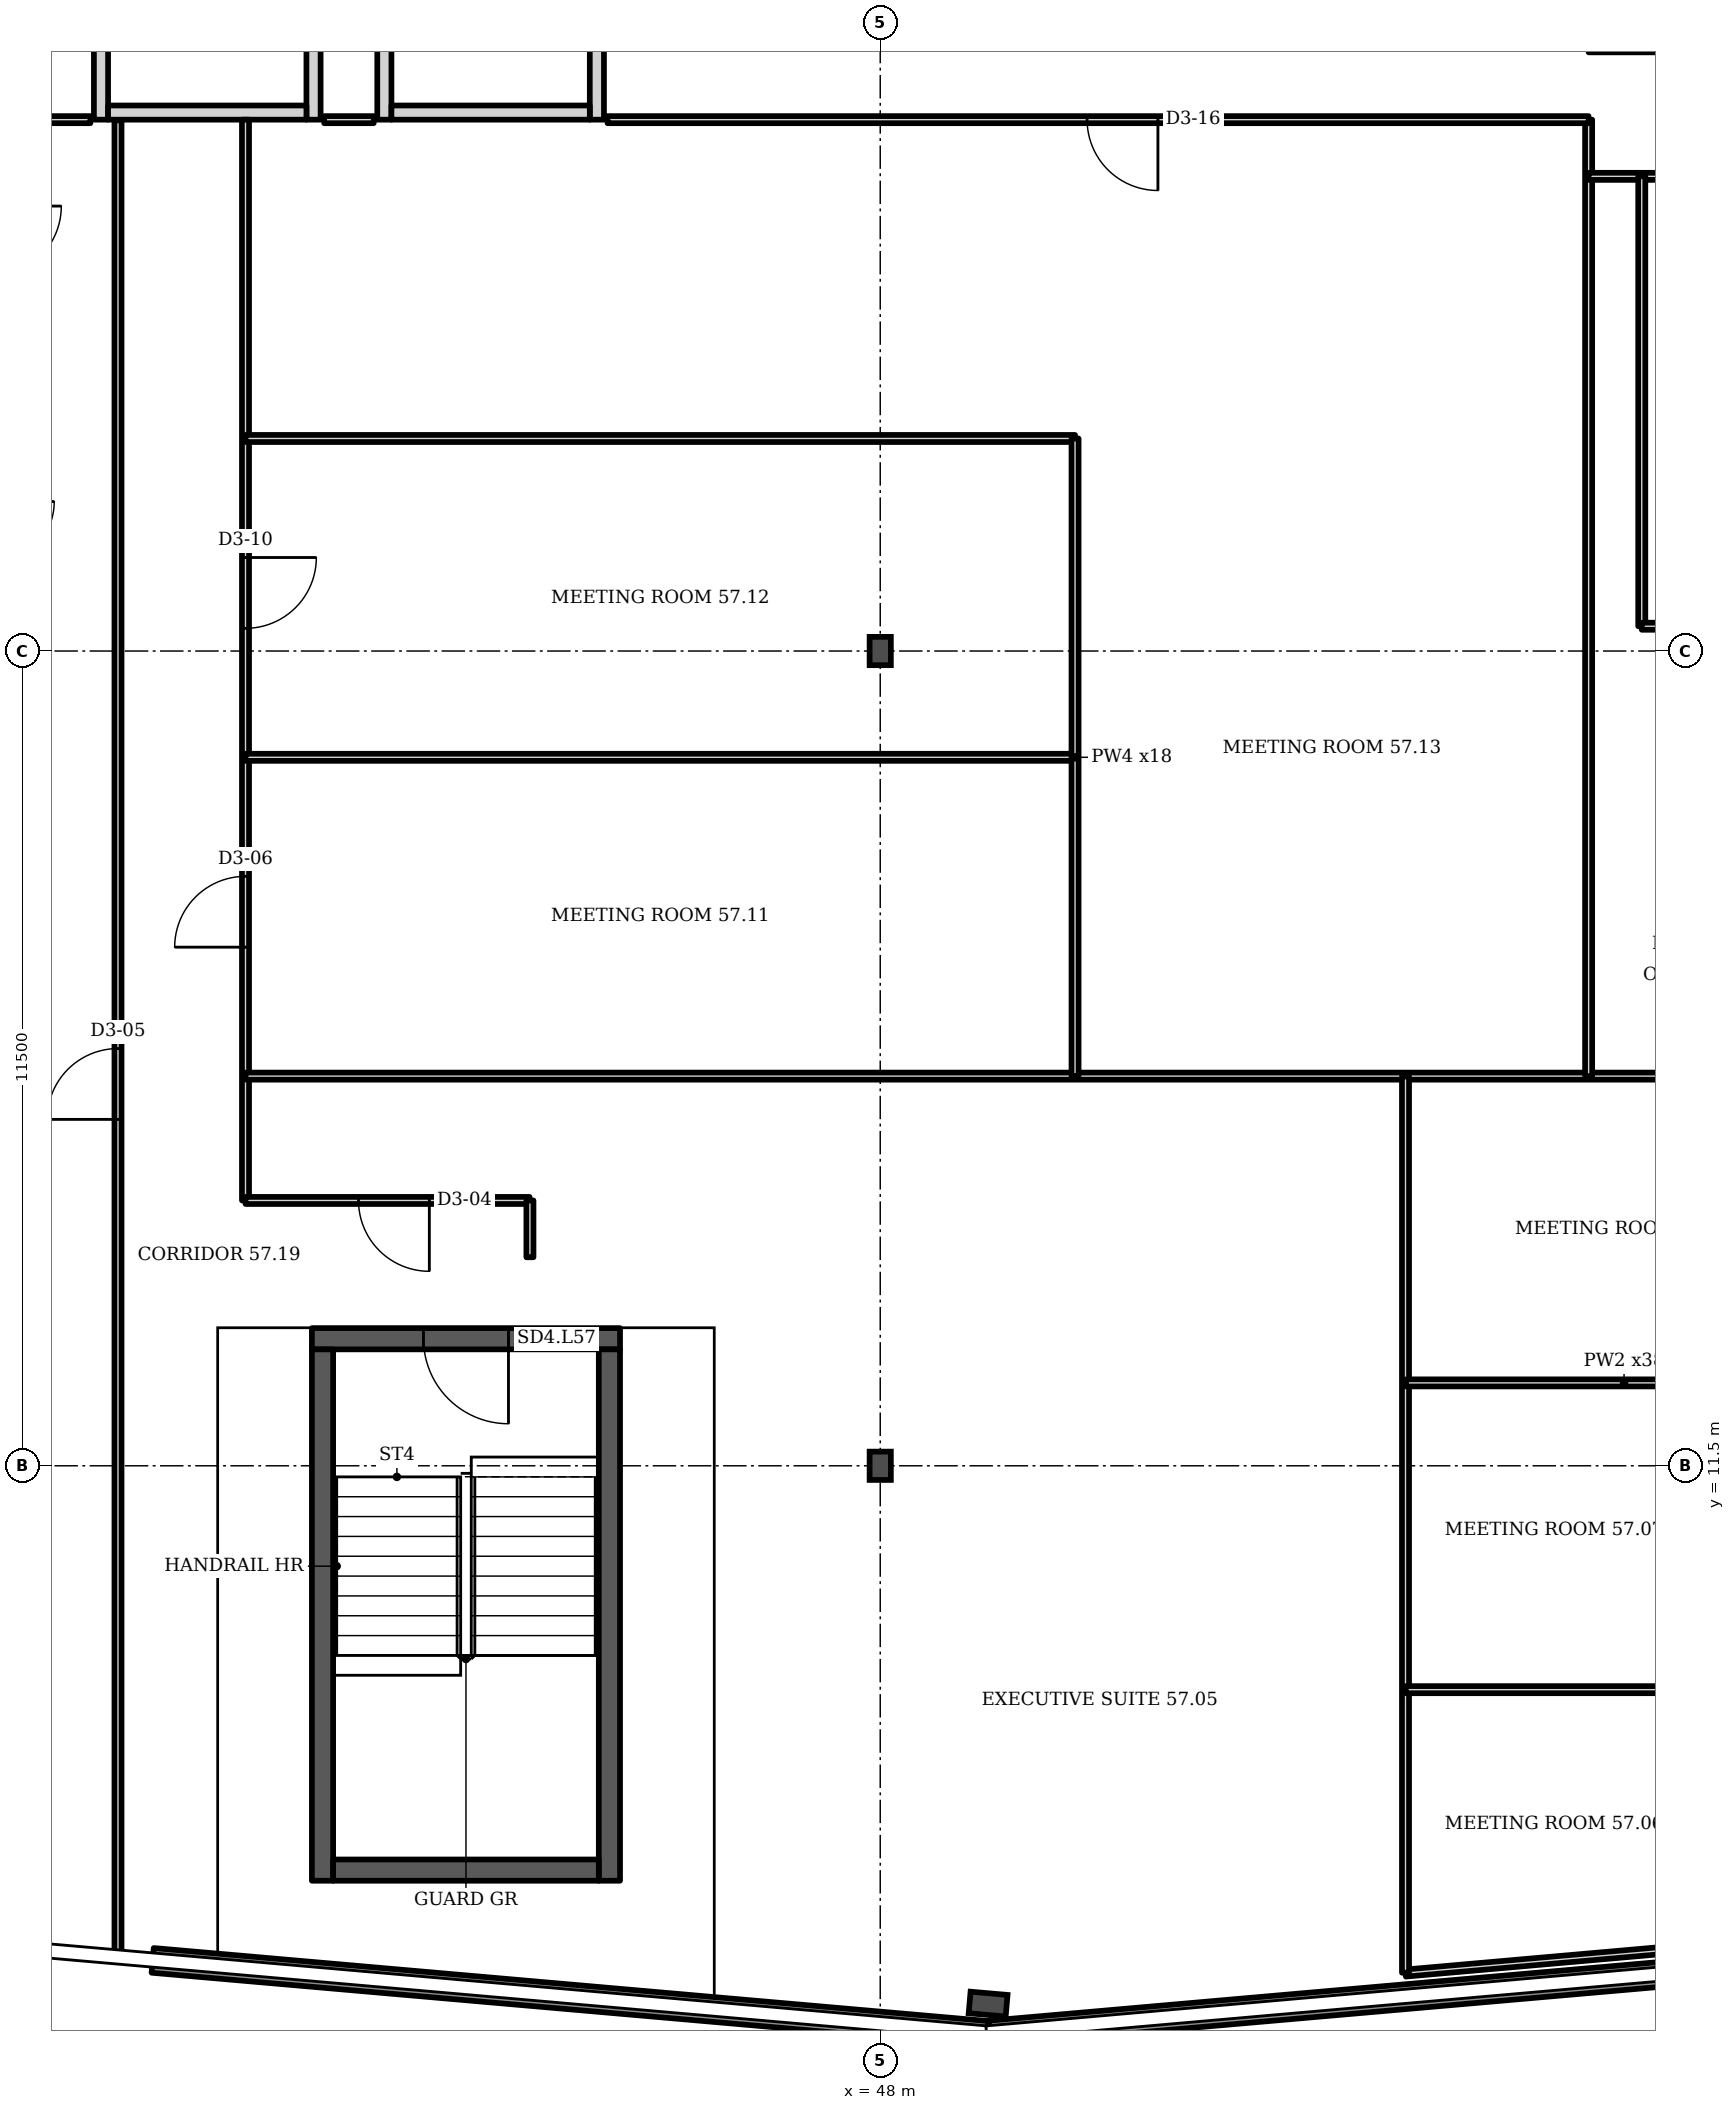
"""IFC4 building model, lengths in metres.
Left out: names, types, materials, properties, quantities, classifications, styles, units other than length and angle.
Written with IfcOpenShell. Run it as: python <this file> out.ifc"""

import sys

from ifc_helpers import new_model, si_unit, direction, frame, frame_2d, origin, origin_2d, place, context, subcontext, project, spatial, rectangle, i_section, extrude, element, fill, save


model = new_model("IFC4")
c1 = context("Model", 3, precision=1e-05, world=origin(), true_north=direction((0.0, 1.0)))
c2 = subcontext(c1, "Body", "Model", "MODEL_VIEW")
j1 = project(units=[si_unit("LENGTHUNIT", "METRE"), si_unit("PLANEANGLEUNIT", "RADIAN")], contexts=[c1])
p1 = place(None, origin())
s1 = spatial("IfcSite", under=j1, at=p1, CompositionType="ELEMENT")
p2 = place(p1, origin())
s2 = spatial("IfcBuilding", under=s1, at=p2, CompositionType="ELEMENT")
p3 = place(p2, frame((0.0, 0.0, 228.7)))
s3 = spatial("IfcBuildingStorey", under=s2, at=p3, CompositionType="ELEMENT", Elevation=228.7)
p4 = place(p3, frame((49.523, 3.902, 0.0), z_axis=(0.0, 0.0, 1.0), x_axis=(-0.087156, -0.996197, 0.0)))
e1 = element("IfcColumn", 1, at=p4, inside=s3, PredefinedType="COLUMN", context=c2, shape_type="SweptSolid", body=[
    extrude(i_section(OverallWidth=0.306, OverallDepth=0.524, WebThickness=0.021, FlangeThickness=0.04, FilletRadius=0.027, at=origin_2d()), origin(), (0.0, 0.0, 1.0), 3.6),
])
for number, where, z_axis, x_axis in (
    (2, (48.0, 11.5, 0.0), (0.0, 0.0, 1.0), (1.0, 0.0, 0.0)),
    (3, (48.0, 23.0, 0.0), (0.0, 0.0, 1.0), (1.0, 0.0, 0.0)),
):
    element("IfcColumn", number, at=place(p3, frame(where, z_axis=z_axis, x_axis=x_axis)), inside=s3, PredefinedType="COLUMN", context=c2, shape_type="SweptSolid", body=[
        extrude(i_section(OverallWidth=0.3, OverallDepth=0.4, WebThickness=0.013, FlangeThickness=0.024, FilletRadius=0.027, at=origin_2d()), origin(), (0.0, 0.0, 1.0), 3.6),
    ])
p5 = place(p3, frame((37.729, 4.519, 0.0), z_axis=(0.0, 0.0, 1.0), x_axis=(0.99619, -0.087167, 0.0)))
e4 = element("IfcWall", 4, at=p5, inside=s3, PredefinedType="SOLIDWALL", context=c2, shape_type="SweptSolid", body=[
    extrude(rectangle(XDim=11.831, YDim=0.35, at=frame_2d((5.915, 0.0))), origin(), (0.0, 0.0, 1.0), 1.0),
])
p6 = place(p3, frame((49.545, 3.493, 0.0), z_axis=(0.0, 0.0, 1.0), x_axis=(0.996196, 0.087141, 0.0)))
e5 = element("IfcWall", 5, at=p6, inside=s3, PredefinedType="SOLIDWALL", context=c2, shape_type="SweptSolid", body=[
    extrude(rectangle(XDim=11.803, YDim=0.35, at=frame_2d((5.902, 0.0))), origin(), (0.0, 0.0, 1.0), 1.0),
])
p7 = place(p3, frame((37.0, 30.5, 0.0), z_axis=(0.0, 0.0, 1.0), x_axis=(0.0, 1.0, 0.0)))
e6 = element("IfcWall", 6, at=p7, inside=s3, PredefinedType="PARTITIONING", context=c2, shape_type="SweptSolid", body=[
    extrude(rectangle(XDim=3.5, YDim=0.2, at=frame_2d((1.75, 0.0))), origin(), (0.0, 0.0, 1.0), 3.2),
])
p8 = place(p7, frame((1.2, 0.0, 0.0)))
e7 = element("IfcOpeningElement", 7, at=p8, cuts=e6, PredefinedType="OPENING", context=c2, shape_type="SweptSolid", body=[
    extrude(rectangle(XDim=1.1, YDim=2.1, at=frame_2d((0.55, 1.05))), frame((0.0, 0.11, 0.0), z_axis=(0.0, -1.0, 0.0), x_axis=(1.0, 0.0, 0.0)), (0.0, 0.0, 1.0), 0.22),
])
p9 = place(p3, frame((40.0, 30.5, 0.0), z_axis=(0.0, 0.0, 1.0), x_axis=(0.0, 1.0, 0.0)))
e8 = element("IfcWall", 8, at=p9, inside=s3, PredefinedType="PARTITIONING", context=c2, shape_type="SweptSolid", body=[
    extrude(rectangle(XDim=3.5, YDim=0.2, at=frame_2d((1.75, 0.0))), origin(), (0.0, 0.0, 1.0), 3.2),
])
p10 = place(p3, frame((37.1, 30.6, 0.0), z_axis=(0.0, 0.0, 1.0), x_axis=(1.0, 0.0, 0.0)))
e9 = element("IfcWall", 9, at=p10, inside=s3, PredefinedType="PARTITIONING", context=c2, shape_type="SweptSolid", body=[
    extrude(rectangle(XDim=2.8, YDim=0.2, at=frame_2d((1.4, 0.0))), origin(), (0.0, 0.0, 1.0), 3.2),
])
p11 = place(p3, frame((41.0, 30.5, 0.0), z_axis=(0.0, 0.0, 1.0), x_axis=(0.0, 1.0, 0.0)))
e10 = element("IfcWall", 10, at=p11, inside=s3, PredefinedType="PARTITIONING", context=c2, shape_type="SweptSolid", body=[
    extrude(rectangle(XDim=3.5, YDim=0.2, at=frame_2d((1.75, 0.0))), origin(), (0.0, 0.0, 1.0), 3.2),
])
p12 = place(p3, frame((44.0, 30.5, 0.0), z_axis=(0.0, 0.0, 1.0), x_axis=(0.0, 1.0, 0.0)))
e11 = element("IfcWall", 11, at=p12, inside=s3, PredefinedType="PARTITIONING", context=c2, shape_type="SweptSolid", body=[
    extrude(rectangle(XDim=3.5, YDim=0.2, at=frame_2d((1.75, 0.0))), origin(), (0.0, 0.0, 1.0), 3.2),
])
p13 = place(p12, frame((1.2, 0.0, 0.0)))
e12 = element("IfcOpeningElement", 12, at=p13, cuts=e11, PredefinedType="OPENING", context=c2, shape_type="SweptSolid", body=[
    extrude(rectangle(XDim=1.1, YDim=2.1, at=frame_2d((0.55, 1.05))), frame((0.0, 0.11, 0.0), z_axis=(0.0, -1.0, 0.0), x_axis=(1.0, 0.0, 0.0)), (0.0, 0.0, 1.0), 0.22),
])
p14 = place(p3, frame((41.1, 30.6, 0.0), z_axis=(0.0, 0.0, 1.0), x_axis=(1.0, 0.0, 0.0)))
e13 = element("IfcWall", 13, at=p14, inside=s3, PredefinedType="PARTITIONING", context=c2, shape_type="SweptSolid", body=[
    extrude(rectangle(XDim=2.8, YDim=0.2, at=frame_2d((1.4, 0.0))), origin(), (0.0, 0.0, 1.0), 3.2),
])
p15 = place(p3, frame((39.977, 13.293, 0.0), z_axis=(0.0, 0.0, 1.0), x_axis=(1.0, 0.0, 0.0)))
e14 = element("IfcWall", 14, at=p15, inside=s3, PredefinedType="SHEAR", context=c2, shape_type="SweptSolid", body=[
    extrude(rectangle(XDim=4.35, YDim=0.3, at=frame_2d((2.175, 0.0))), origin(), (0.0, 0.0, 1.0), 3.2),
])
p16 = place(p15, frame((1.575, 0.0, 0.0)))
e15 = element("IfcOpeningElement", 15, at=p16, cuts=e14, PredefinedType="OPENING", context=c2, shape_type="SweptSolid", body=[
    extrude(rectangle(XDim=1.2, YDim=2.1, at=frame_2d((0.6, 1.05))), frame((0.0, 0.16, 0.0), z_axis=(0.0, -1.0, 0.0), x_axis=(1.0, 0.0, 0.0)), (0.0, 0.0, 1.0), 0.32),
])
p17 = place(p3, frame((24.8, 30.5, 0.0), z_axis=(0.0, 0.0, 1.0), x_axis=(1.0, 0.0, 0.0)))
e16 = element("IfcWall", 16, at=p17, inside=s3, PredefinedType="PARTITIONING", context=c2, shape_type="SweptSolid", body=[
    extrude(rectangle(XDim=12.05, YDim=0.1, at=frame_2d((6.025, 0.0))), origin(), (0.0, 0.0, 1.0), 3.2),
])
p18 = place(p3, frame((37.24, 4.587, 0.0), z_axis=(0.0, 0.0, 1.0), x_axis=(0.0, 1.0, 0.0)))
e17 = element("IfcWall", 17, at=p18, inside=s3, PredefinedType="PARTITIONING", context=c2, shape_type="SweptSolid", body=[
    extrude(rectangle(XDim=25.903, YDim=0.1, at=frame_2d((12.952, 0.0))), origin(), (0.0, 0.0, 1.0), 2.58),
])
p19 = place(p18, frame((11.802, 0.0, 0.0)))
e18 = element("IfcOpeningElement", 18, at=p19, cuts=e17, PredefinedType="OPENING", context=c2, shape_type="SweptSolid", body=[
    extrude(rectangle(XDim=1.0, YDim=2.1, at=frame_2d((0.5, 1.05))), frame((0.0, 0.06, 0.0), z_axis=(0.0, -1.0, 0.0), x_axis=(1.0, 0.0, 0.0)), (0.0, 0.0, 1.0), 0.12),
])
p20 = place(p3, frame((39.04, 15.245, 0.0), z_axis=(0.0, 0.0, 1.0), x_axis=(0.0, 1.0, 0.0)))
e19 = element("IfcWall", 19, at=p20, inside=s3, PredefinedType="PARTITIONING", context=c2, shape_type="SweptSolid", body=[
    extrude(rectangle(XDim=15.255, YDim=0.1, at=frame_2d((7.627, 0.0))), origin(), (0.0, 0.0, 1.0), 3.2),
])
p21 = place(p20, frame((3.575, 0.0, 0.0)))
e20 = element("IfcOpeningElement", 20, at=p21, cuts=e19, PredefinedType="OPENING", context=c2, shape_type="SweptSolid", body=[
    extrude(rectangle(XDim=1.0, YDim=2.1, at=frame_2d((0.5, 1.05))), frame((0.0, 0.06, 0.0), z_axis=(0.0, -1.0, 0.0), x_axis=(1.0, 0.0, 0.0)), (0.0, 0.0, 1.0), 0.12),
])
p22 = place(p20, frame((8.075, 0.0, 0.0)))
e21 = element("IfcOpeningElement", 21, at=p22, cuts=e19, PredefinedType="OPENING", context=c2, shape_type="SweptSolid", body=[
    extrude(rectangle(XDim=1.0, YDim=2.1, at=frame_2d((0.5, 1.05))), frame((0.0, 0.06, 0.0), z_axis=(0.0, -1.0, 0.0), x_axis=(1.0, 0.0, 0.0)), (0.0, 0.0, 1.0), 0.12),
])
p23 = place(p3, frame((39.04, 15.245, 0.0), z_axis=(0.0, 0.0, 1.0), x_axis=(1.0, 0.0, 0.0)))
e22 = element("IfcWall", 22, at=p23, inside=s3, PredefinedType="PARTITIONING", context=c2, shape_type="SweptSolid", body=[
    extrude(rectangle(XDim=4.01, YDim=0.1, at=frame_2d((2.005, 0.0))), origin(), (0.0, 0.0, 1.0), 3.2),
])
p24 = place(p23, frame((1.595, 0.0, 0.0)))
e23 = element("IfcOpeningElement", 23, at=p24, cuts=e22, PredefinedType="OPENING", context=c2, shape_type="SweptSolid", body=[
    extrude(rectangle(XDim=1.0, YDim=2.1, at=frame_2d((0.5, 1.05))), frame((0.0, 0.06, 0.0), z_axis=(0.0, -1.0, 0.0), x_axis=(1.0, 0.0, 0.0)), (0.0, 0.0, 1.0), 0.12),
])
p25 = place(p3, frame((39.04, 17.0, 0.0), z_axis=(0.0, 0.0, 1.0), x_axis=(1.0, 0.0, 0.0)))
e24 = element("IfcWall", 24, at=p25, inside=s3, PredefinedType="PARTITIONING", context=c2, shape_type="SweptSolid", body=[
    extrude(rectangle(XDim=22.54, YDim=0.1, at=frame_2d((11.27, 0.0))), origin(), (0.0, 0.0, 1.0), 3.2),
])
for number, where, z_axis, x_axis in (
    (25, (39.04, 21.5, 0.0), (0.0, 0.0, 1.0), (1.0, 0.0, 0.0)),
    (26, (39.04, 26.0, 0.0), (0.0, 0.0, 1.0), (1.0, 0.0, 0.0)),
):
    element("IfcWall", number, at=place(p3, frame(where, z_axis=z_axis, x_axis=x_axis)), inside=s3, PredefinedType="PARTITIONING", context=c2, shape_type="SweptSolid", body=[
        extrude(rectangle(XDim=11.71, YDim=0.1, at=frame_2d((5.855, 0.0))), origin(), (0.0, 0.0, 1.0), 3.2),
    ])
p26 = place(p3, frame((40.15, 30.5, 0.0), z_axis=(0.0, 0.0, 1.0), x_axis=(1.0, 0.0, 0.0)))
e27 = element("IfcWall", 27, at=p26, inside=s3, PredefinedType="PARTITIONING", context=c2, shape_type="SweptSolid", body=[
    extrude(rectangle(XDim=0.7, YDim=0.1, at=frame_2d((0.35, 0.0))), origin(), (0.0, 0.0, 1.0), 3.2),
])
p27 = place(p3, frame((43.055, 14.443, 0.0), z_axis=(0.0, 0.0, 1.0), x_axis=(0.0, 1.0, 0.0)))
e28 = element("IfcWall", 28, at=p27, inside=s3, PredefinedType="PARTITIONING", context=c2, shape_type="SweptSolid", body=[
    extrude(rectangle(XDim=0.802, YDim=0.1, at=frame_2d((0.401, 0.0))), origin(), (0.0, 0.0, 1.0), 3.2),
])
p28 = place(p3, frame((50.75, 17.0, 0.0), z_axis=(0.0, 0.0, 1.0), x_axis=(0.0, 1.0, 0.0)))
e29 = element("IfcWall", 29, at=p28, inside=s3, PredefinedType="PARTITIONING", context=c2, shape_type="SweptSolid", body=[
    extrude(rectangle(XDim=9.0, YDim=0.1, at=frame_2d((4.5, 0.0))), origin(), (0.0, 0.0, 1.0), 3.2),
])
p29 = place(p3, frame((55.415, 4.34, 0.0), z_axis=(0.0, 0.0, 1.0), x_axis=(0.996159, 0.087534, 0.0)))
e30 = element("IfcWall", 30, at=p29, inside=s3, PredefinedType="PARTITIONING", context=c2, shape_type="SweptSolid", body=[
    extrude(rectangle(XDim=5.31, YDim=0.1, at=frame_2d((2.655, 0.0))), origin(), (0.0, 0.0, 1.0), 2.58),
])
p30 = place(p3, frame((55.415, 4.345, 0.0), z_axis=(0.0, 0.0, 1.0), x_axis=(0.0, 1.0, 0.0)))
e31 = element("IfcWall", 31, at=p30, inside=s3, PredefinedType="PARTITIONING", context=c2, shape_type="SweptSolid", body=[
    extrude(rectangle(XDim=12.65, YDim=0.1, at=frame_2d((6.325, 0.0))), origin(), (0.0, 0.0, 1.0), 3.2),
])
for number, where, z_axis, x_axis in (
    (32, (55.42, 8.34, 0.0), (0.0, 0.0, 1.0), (1.0, 0.0, 0.0)),
    (33, (55.42, 12.67, 0.0), (0.0, 0.0, 1.0), (1.0, 0.0, 0.0)),
):
    element("IfcWall", number, at=place(p3, frame(where, z_axis=z_axis, x_axis=x_axis)), inside=s3, PredefinedType="PARTITIONING", context=c2, shape_type="SweptSolid", body=[
        extrude(rectangle(XDim=6.16, YDim=0.1, at=frame_2d((3.08, 0.0))), origin(), (0.0, 0.0, 1.0), 3.2),
    ])
p31 = place(p3, frame((58.0, 17.0, 0.0), z_axis=(0.0, 0.0, 1.0), x_axis=(0.0, 1.0, 0.0)))
e34 = element("IfcWall", 34, at=p31, inside=s3, PredefinedType="PARTITIONING", context=c2, shape_type="SweptSolid", body=[
    extrude(rectangle(XDim=13.5, YDim=0.1, at=frame_2d((6.75, 0.0))), origin(), (0.0, 0.0, 1.0), 3.2),
])
p32 = place(p3, frame((58.0, 29.7, 0.0), z_axis=(0.0, 0.0, 1.0), x_axis=(1.0, 0.0, 0.0)))
e35 = element("IfcWall", 35, at=p32, inside=s3, PredefinedType="PARTITIONING", context=c2, shape_type="SweptSolid", body=[
    extrude(rectangle(XDim=3.58, YDim=0.1, at=frame_2d((1.79, 0.0))), origin(), (0.0, 0.0, 1.0), 3.2),
])
p33 = place(p3, frame((58.75, 23.35, 0.0), z_axis=(0.0, 0.0, 1.0), x_axis=(0.0, 1.0, 0.0)))
e36 = element("IfcWall", 36, at=p33, inside=s3, PredefinedType="PARTITIONING", context=c2, shape_type="SweptSolid", body=[
    extrude(rectangle(XDim=6.35, YDim=0.1, at=frame_2d((3.175, 0.0))), origin(), (0.0, 0.0, 1.0), 3.2),
])
p34 = place(p3, frame((58.75, 23.35, 0.0), z_axis=(0.0, 0.0, 1.0), x_axis=(1.0, 0.0, 0.0)))
e37 = element("IfcWall", 37, at=p34, inside=s3, PredefinedType="PARTITIONING", context=c2, shape_type="SweptSolid", body=[
    extrude(rectangle(XDim=2.83, YDim=0.1, at=frame_2d((1.415, 0.0))), origin(), (0.0, 0.0, 1.0), 3.2),
])
p35 = place(p3, frame((44.15, 30.5, 0.0), z_axis=(0.0, 0.0, 1.0), x_axis=(1.0, 0.0, 0.0)))
e38 = element("IfcWall", 38, at=p35, inside=s3, PredefinedType="PARTITIONING", context=c2, shape_type="SweptSolid", body=[
    extrude(rectangle(XDim=13.85, YDim=0.1, at=frame_2d((6.925, 0.0))), origin(), (0.0, 0.0, 1.0), 3.2),
])
p36 = place(p35, frame((6.77, 0.0, 0.0)))
e39 = element("IfcOpeningElement", 39, at=p36, cuts=e38, PredefinedType="OPENING", context=c2, shape_type="SweptSolid", body=[
    extrude(rectangle(XDim=1.0, YDim=2.1, at=frame_2d((0.5, 1.05))), frame((0.0, 0.06, 0.0), z_axis=(0.0, -1.0, 0.0), x_axis=(1.0, 0.0, 0.0)), (0.0, 0.0, 1.0), 0.12),
])
for number, where, z_axis, x_axis in (
    (40, (40.127, 5.643, 0.0), (0.0, 0.0, 1.0), (0.0, 1.0, 0.0)),
    (41, (44.177, 5.643, 0.0), (0.0, 0.0, 1.0), (0.0, 1.0, 0.0)),
):
    element("IfcWall", number, at=place(p3, frame(where, z_axis=z_axis, x_axis=x_axis)), inside=s3, PredefinedType="SHEAR", context=c2, shape_type="SweptSolid", body=[
        extrude(rectangle(XDim=7.5, YDim=0.3, at=frame_2d((3.75, 0.0))), origin(), (0.0, 0.0, 1.0), 3.2),
    ])
p37 = place(p3, frame((40.277, 5.793, 0.0), z_axis=(0.0, 0.0, 1.0), x_axis=(1.0, 0.0, 0.0)))
e42 = element("IfcWall", 42, at=p37, inside=s3, PredefinedType="SHEAR", context=c2, shape_type="SweptSolid", body=[
    extrude(rectangle(XDim=3.75, YDim=0.3, at=frame_2d((1.875, 0.0))), origin(), (0.0, 0.0, 1.0), 3.2),
])
p38 = place(p16, origin())
e43 = element("IfcDoor", 43, at=p38, inside=s3, OperationType="SINGLE_SWING_RIGHT", PredefinedType="DOOR", context=c2, shape_type="SweptSolid", body=[
    extrude(rectangle(XDim=1.2, YDim=2.1, at=frame_2d((0.6, 1.05))), frame((0.0, 0.025, 0.0), z_axis=(0.0, -1.0, 0.0), x_axis=(1.0, 0.0, 0.0)), (0.0, 0.0, 1.0), 0.05),
])
fill(e15, e43)
p39 = place(p24, origin())
e44 = element("IfcDoor", 44, at=p39, inside=s3, OperationType="SINGLE_SWING_RIGHT", PredefinedType="DOOR", context=c2, shape_type="SweptSolid", body=[
    extrude(rectangle(XDim=1.0, YDim=2.1, at=frame_2d((0.5, 1.05))), frame((0.0, 0.025, 0.0), z_axis=(0.0, -1.0, 0.0), x_axis=(1.0, 0.0, 0.0)), (0.0, 0.0, 1.0), 0.05),
])
fill(e23, e44)
p40 = place(p19, origin())
e45 = element("IfcDoor", 45, at=p40, inside=s3, OperationType="SINGLE_SWING_LEFT", PredefinedType="DOOR", context=c2, shape_type="SweptSolid", body=[
    extrude(rectangle(XDim=1.0, YDim=2.1, at=frame_2d((0.5, 1.05))), frame((0.0, 0.025, 0.0), z_axis=(0.0, -1.0, 0.0), x_axis=(1.0, 0.0, 0.0)), (0.0, 0.0, 1.0), 0.05),
])
fill(e18, e45)
p41 = place(p21, origin())
e46 = element("IfcDoor", 46, at=p41, inside=s3, OperationType="SINGLE_SWING_LEFT", PredefinedType="DOOR", context=c2, shape_type="SweptSolid", body=[
    extrude(rectangle(XDim=1.0, YDim=2.1, at=frame_2d((0.5, 1.05))), frame((0.0, 0.025, 0.0), z_axis=(0.0, -1.0, 0.0), x_axis=(1.0, 0.0, 0.0)), (0.0, 0.0, 1.0), 0.05),
])
fill(e20, e46)
p42 = place(p22, origin())
e47 = element("IfcDoor", 47, at=p42, inside=s3, OperationType="SINGLE_SWING_RIGHT", PredefinedType="DOOR", context=c2, shape_type="SweptSolid", body=[
    extrude(rectangle(XDim=1.0, YDim=2.1, at=frame_2d((0.5, 1.05))), frame((0.0, 0.025, 0.0), z_axis=(0.0, -1.0, 0.0), x_axis=(1.0, 0.0, 0.0)), (0.0, 0.0, 1.0), 0.05),
])
fill(e21, e47)
p43 = place(p36, origin())
e48 = element("IfcDoor", 48, at=p43, inside=s3, OperationType="SINGLE_SWING_RIGHT", PredefinedType="DOOR", context=c2, shape_type="SweptSolid", body=[
    extrude(rectangle(XDim=1.0, YDim=2.1, at=frame_2d((0.5, 1.05))), frame((0.0, 0.025, 0.0), z_axis=(0.0, -1.0, 0.0), x_axis=(1.0, 0.0, 0.0)), (0.0, 0.0, 1.0), 0.05),
])
fill(e39, e48)
save(model, sys.argv[1])
